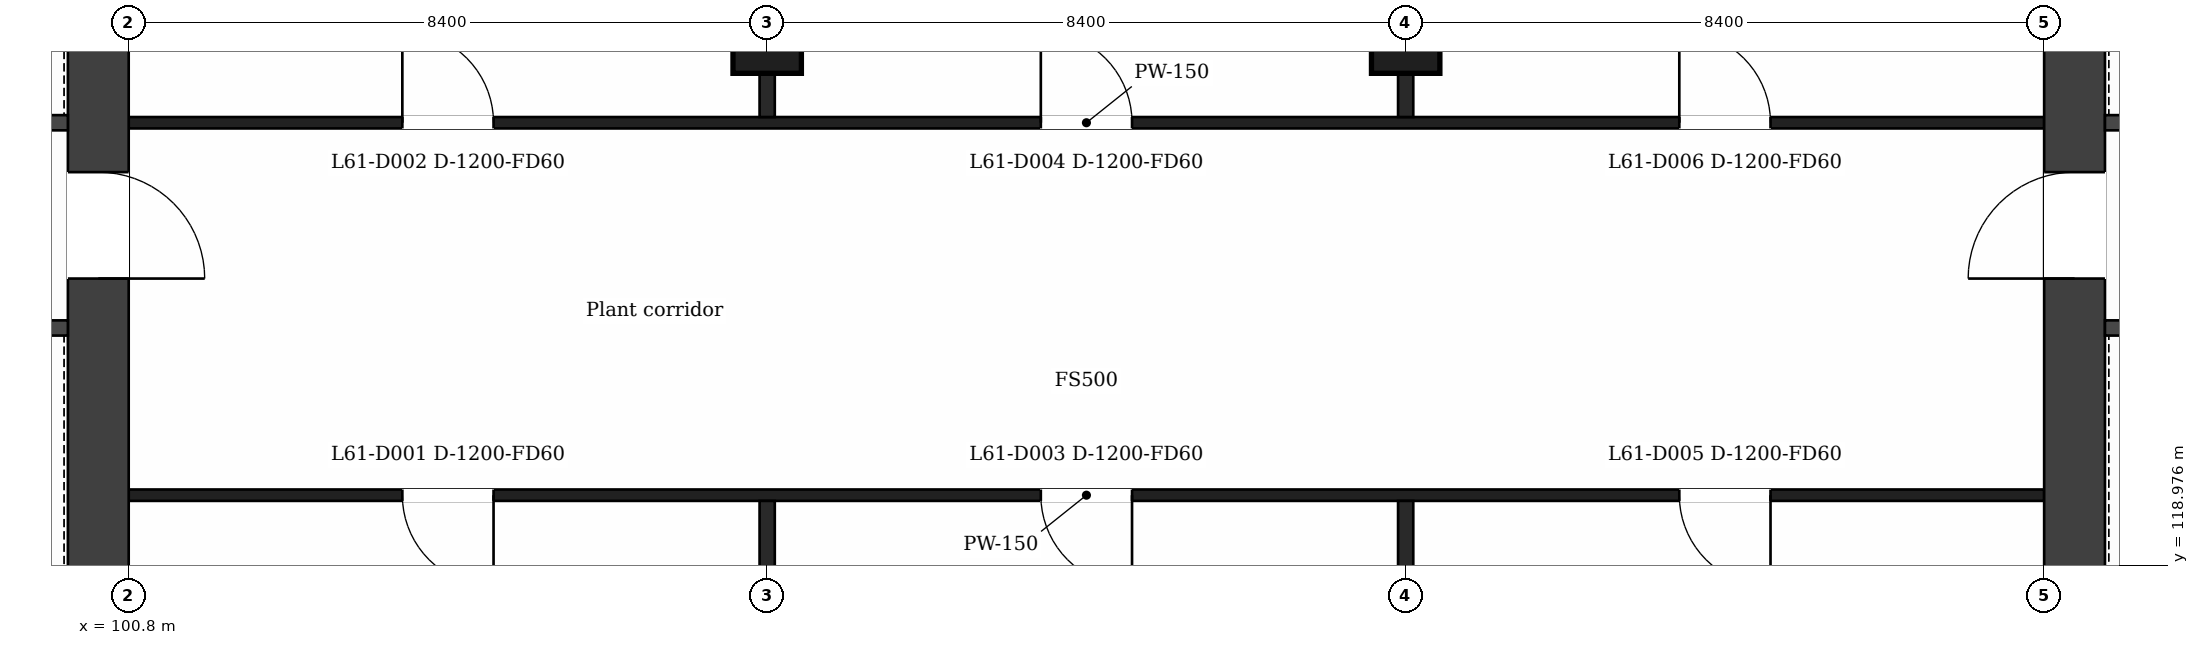
"""IFC4 building model, lengths in metres.
Left out: names, types, materials, properties, quantities, classifications, styles, units other than length and angle.
Written with IfcOpenShell. Run it as: python <this file> out.ifc"""

import sys

from ifc_helpers import new_model, si_unit, direction, frame, frame_2d, origin, origin_2d, place, context, subcontext, project, spatial, rectangle, extrude, element, fill, save


model = new_model("IFC4")
c1 = context("Model", 3, precision=1e-05, world=origin(), true_north=direction((0.0, 1.0)))
c2 = subcontext(c1, "Body", "Model", "MODEL_VIEW")
j1 = project(units=[si_unit("LENGTHUNIT", "METRE"), si_unit("PLANEANGLEUNIT", "RADIAN")], contexts=[c1])
p1 = place(None, origin())
s1 = spatial("IfcSite", under=j1, at=p1, CompositionType="ELEMENT")
p2 = place(p1, origin())
s2 = spatial("IfcBuilding", under=s1, at=p2, CompositionType="ELEMENT")
p3 = place(p2, frame((0.0, 0.0, 254.0)))
s3 = spatial("IfcBuildingStorey", under=s2, at=p3, CompositionType="ELEMENT", Elevation=254.0)
p4 = place(p3, frame((100.4, 132.0, 0.0), z_axis=(0.0, 0.0, 1.0), x_axis=(0.0, -1.0, 0.0)))
e1 = element("IfcWall", 1, at=p4, inside=s3, PredefinedType="SHEAR", context=c2, shape_type="SweptSolid", body=[
    extrude(rectangle(XDim=21.2, YDim=0.8, at=frame_2d((10.6, 0.0))), origin(), (0.0, 0.0, 1.0), 5.0),
])
p5 = place(p4, frame((2.4, 0.0, 0.0)))
e2 = element("IfcOpeningElement", 2, at=p5, cuts=e1, PredefinedType="OPENING", context=c2, shape_type="SweptSolid", body=[
    extrude(rectangle(XDim=1.2, YDim=2.1, at=frame_2d((0.6, 1.05))), frame((0.0, 0.41, 0.0), z_axis=(0.0, -1.0, 0.0), x_axis=(1.0, 0.0, 0.0)), (0.0, 0.0, 1.0), 0.82),
])
p6 = place(p4, frame((7.85, 0.0, 0.0)))
e3 = element("IfcOpeningElement", 3, at=p6, cuts=e1, PredefinedType="OPENING", context=c2, shape_type="SweptSolid", body=[
    extrude(rectangle(XDim=1.4, YDim=2.1, at=frame_2d((0.7, 1.05))), frame((0.0, 0.41, 0.0), z_axis=(0.0, -1.0, 0.0), x_axis=(1.0, 0.0, 0.0)), (0.0, 0.0, 1.0), 0.82),
])
p7 = place(p3, frame((126.4, 110.8, 0.0), z_axis=(0.0, 0.0, 1.0), x_axis=(0.0, 1.0, 0.0)))
e4 = element("IfcWall", 4, at=p7, inside=s3, PredefinedType="SHEAR", context=c2, shape_type="SweptSolid", body=[
    extrude(rectangle(XDim=21.2, YDim=0.8, at=frame_2d((10.6, 0.0))), origin(), (0.0, 0.0, 1.0), 5.0),
])
p8 = place(p7, frame((1.0, 0.0, 0.0)))
e5 = element("IfcOpeningElement", 5, at=p8, cuts=e4, PredefinedType="OPENING", context=c2, shape_type="SweptSolid", body=[
    extrude(rectangle(XDim=1.2, YDim=2.1, at=frame_2d((0.6, 1.05))), frame((0.0, 0.41, 0.0), z_axis=(0.0, -1.0, 0.0), x_axis=(1.0, 0.0, 0.0)), (0.0, 0.0, 1.0), 0.82),
])
p9 = place(p7, frame((11.95, 0.0, 0.0)))
e6 = element("IfcOpeningElement", 6, at=p9, cuts=e4, PredefinedType="OPENING", context=c2, shape_type="SweptSolid", body=[
    extrude(rectangle(XDim=1.4, YDim=2.1, at=frame_2d((0.7, 1.05))), frame((0.0, 0.41, 0.0), z_axis=(0.0, -1.0, 0.0), x_axis=(1.0, 0.0, 0.0)), (0.0, 0.0, 1.0), 0.82),
])
for number, where, z_axis, x_axis in (
    (7, (109.2, 125.9, 0.0), (0.0, 0.0, 1.0), (1.0, 0.0, 0.0)),
    (8, (117.6, 125.9, 0.0), (0.0, 0.0, 1.0), (1.0, 0.0, 0.0)),
):
    element("IfcColumn", number, at=place(p3, frame(where, z_axis=z_axis, x_axis=x_axis)), inside=s3, PredefinedType="COLUMN", context=c2, shape_type="SweptSolid", body=[
        extrude(rectangle(XDim=0.9, YDim=0.9, at=origin_2d()), origin(), (0.0, 0.0, 1.0), 5.0),
    ])
p10 = place(p3, frame((100.8, 119.9, 0.0), z_axis=(0.0, 0.0, 1.0), x_axis=(1.0, 0.0, 0.0)))
e9 = element("IfcWall", 9, at=p10, inside=s3, PredefinedType="PARTITIONING", context=c2, shape_type="SweptSolid", body=[
    extrude(rectangle(XDim=25.2, YDim=0.15, at=frame_2d((12.6, 0.0))), origin(), (0.0, 0.0, 1.0), 4.68),
])
p11 = place(p10, frame((3.6, 0.0, 0.0)))
e10 = element("IfcOpeningElement", 10, at=p11, cuts=e9, PredefinedType="OPENING", context=c2, shape_type="SweptSolid", body=[
    extrude(rectangle(XDim=1.2, YDim=2.1, at=frame_2d((0.6, 1.05))), frame((0.0, 0.085, 0.0), z_axis=(0.0, -1.0, 0.0), x_axis=(1.0, 0.0, 0.0)), (0.0, 0.0, 1.0), 0.17),
])
p12 = place(p10, frame((12.0, 0.0, 0.0)))
e11 = element("IfcOpeningElement", 11, at=p12, cuts=e9, PredefinedType="OPENING", context=c2, shape_type="SweptSolid", body=[
    extrude(rectangle(XDim=1.2, YDim=2.1, at=frame_2d((0.6, 1.05))), frame((0.0, 0.085, 0.0), z_axis=(0.0, -1.0, 0.0), x_axis=(1.0, 0.0, 0.0)), (0.0, 0.0, 1.0), 0.17),
])
p13 = place(p10, frame((20.4, 0.0, 0.0)))
e12 = element("IfcOpeningElement", 12, at=p13, cuts=e9, PredefinedType="OPENING", context=c2, shape_type="SweptSolid", body=[
    extrude(rectangle(XDim=1.2, YDim=2.1, at=frame_2d((0.6, 1.05))), frame((0.0, 0.085, 0.0), z_axis=(0.0, -1.0, 0.0), x_axis=(1.0, 0.0, 0.0)), (0.0, 0.0, 1.0), 0.17),
])
p14 = place(p3, frame((95.227, 122.1, 0.0), z_axis=(0.0, 0.0, 1.0), x_axis=(1.0, 0.0, 0.0)))
e13 = element("IfcWall", 13, at=p14, inside=s3, PredefinedType="PARTITIONING", context=c2, shape_type="SweptSolid", body=[
    extrude(rectangle(XDim=4.773, YDim=0.2, at=frame_2d((2.386, 0.0))), origin(), (0.0, 0.0, 1.0), 4.68),
])
p15 = place(p14, frame((0.585, 0.0, 0.0)))
e14 = element("IfcOpeningElement", 14, at=p15, cuts=e13, PredefinedType="OPENING", context=c2, shape_type="SweptSolid", body=[
    extrude(rectangle(XDim=1.1, YDim=2.1, at=frame_2d((0.55, 1.05))), frame((0.0, 0.11, 0.0), z_axis=(0.0, -1.0, 0.0), x_axis=(1.0, 0.0, 0.0)), (0.0, 0.0, 1.0), 0.22),
])
p16 = place(p14, frame((3.176, 0.0, 0.0)))
e15 = element("IfcOpeningElement", 15, at=p16, cuts=e13, PredefinedType="OPENING", context=c2, shape_type="SweptSolid", body=[
    extrude(rectangle(XDim=1.1, YDim=2.1, at=frame_2d((0.55, 1.05))), frame((0.0, 0.11, 0.0), z_axis=(0.0, -1.0, 0.0), x_axis=(1.0, 0.0, 0.0)), (0.0, 0.0, 1.0), 0.22),
])
p17 = place(p3, frame((126.8, 122.1, 0.0), z_axis=(0.0, 0.0, 1.0), x_axis=(1.0, 0.0, 0.0)))
e16 = element("IfcWall", 16, at=p17, inside=s3, PredefinedType="PARTITIONING", context=c2, shape_type="SweptSolid", body=[
    extrude(rectangle(XDim=4.773, YDim=0.2, at=frame_2d((2.386, 0.0))), origin(), (0.0, 0.0, 1.0), 4.68),
])
p18 = place(p17, frame((3.176, 0.0, 0.0)))
e17 = element("IfcOpeningElement", 17, at=p18, cuts=e16, PredefinedType="OPENING", context=c2, shape_type="SweptSolid", body=[
    extrude(rectangle(XDim=1.1, YDim=2.1, at=frame_2d((0.55, 1.05))), frame((0.0, 0.11, 0.0), z_axis=(0.0, -1.0, 0.0), x_axis=(1.0, 0.0, 0.0)), (0.0, 0.0, 1.0), 0.22),
])
p19 = place(p17, frame((0.497, 0.0, 0.0)))
e18 = element("IfcOpeningElement", 18, at=p19, cuts=e16, PredefinedType="OPENING", context=c2, shape_type="SweptSolid", body=[
    extrude(rectangle(XDim=1.1, YDim=2.1, at=frame_2d((0.55, 1.05))), frame((0.0, 0.11, 0.0), z_axis=(0.0, -1.0, 0.0), x_axis=(1.0, 0.0, 0.0)), (0.0, 0.0, 1.0), 0.22),
])
p20 = place(p3, frame((92.702, 124.8, 0.0), z_axis=(0.0, 0.0, 1.0), x_axis=(1.0, 0.0, 0.0)))
e19 = element("IfcWall", 19, at=p20, inside=s3, PredefinedType="PARTITIONING", context=c2, shape_type="SweptSolid", body=[
    extrude(rectangle(XDim=7.298, YDim=0.2, at=frame_2d((3.649, 0.0))), origin(), (0.0, 0.0, 1.0), 4.68),
])
p21 = place(p20, frame((5.405, 0.0, 0.0)))
e20 = element("IfcOpeningElement", 20, at=p21, cuts=e19, PredefinedType="OPENING", context=c2, shape_type="SweptSolid", body=[
    extrude(rectangle(XDim=1.1, YDim=2.1, at=frame_2d((0.55, 1.05))), frame((0.0, 0.11, 0.0), z_axis=(0.0, -1.0, 0.0), x_axis=(1.0, 0.0, 0.0)), (0.0, 0.0, 1.0), 0.22),
])
p22 = place(p3, frame((126.8, 124.8, 0.0), z_axis=(0.0, 0.0, 1.0), x_axis=(1.0, 0.0, 0.0)))
e21 = element("IfcWall", 21, at=p22, inside=s3, PredefinedType="PARTITIONING", context=c2, shape_type="SweptSolid", body=[
    extrude(rectangle(XDim=4.782, YDim=0.2, at=frame_2d((2.391, 0.0))), origin(), (0.0, 0.0, 1.0), 4.68),
])
p23 = place(p22, frame((0.793, 0.0, 0.0)))
e22 = element("IfcOpeningElement", 22, at=p23, cuts=e21, PredefinedType="OPENING", context=c2, shape_type="SweptSolid", body=[
    extrude(rectangle(XDim=1.1, YDim=2.1, at=frame_2d((0.55, 1.05))), frame((0.0, 0.11, 0.0), z_axis=(0.0, -1.0, 0.0), x_axis=(1.0, 0.0, 0.0)), (0.0, 0.0, 1.0), 0.22),
])
p24 = place(p3, frame((100.8, 124.8, 0.0), z_axis=(0.0, 0.0, 1.0), x_axis=(1.0, 0.0, 0.0)))
e23 = element("IfcWall", 23, at=p24, inside=s3, PredefinedType="PARTITIONING", context=c2, shape_type="SweptSolid", body=[
    extrude(rectangle(XDim=25.2, YDim=0.15, at=frame_2d((12.6, 0.0))), origin(), (0.0, 0.0, 1.0), 4.68),
])
p25 = place(p24, frame((3.6, 0.0, 0.0)))
e24 = element("IfcOpeningElement", 24, at=p25, cuts=e23, PredefinedType="OPENING", context=c2, shape_type="SweptSolid", body=[
    extrude(rectangle(XDim=1.2, YDim=2.1, at=frame_2d((0.6, 1.05))), frame((0.0, 0.085, 0.0), z_axis=(0.0, -1.0, 0.0), x_axis=(1.0, 0.0, 0.0)), (0.0, 0.0, 1.0), 0.17),
])
p26 = place(p24, frame((12.0, 0.0, 0.0)))
e25 = element("IfcOpeningElement", 25, at=p26, cuts=e23, PredefinedType="OPENING", context=c2, shape_type="SweptSolid", body=[
    extrude(rectangle(XDim=1.2, YDim=2.1, at=frame_2d((0.6, 1.05))), frame((0.0, 0.085, 0.0), z_axis=(0.0, -1.0, 0.0), x_axis=(1.0, 0.0, 0.0)), (0.0, 0.0, 1.0), 0.17),
])
p27 = place(p24, frame((20.4, 0.0, 0.0)))
e26 = element("IfcOpeningElement", 26, at=p27, cuts=e23, PredefinedType="OPENING", context=c2, shape_type="SweptSolid", body=[
    extrude(rectangle(XDim=1.2, YDim=2.1, at=frame_2d((0.6, 1.05))), frame((0.0, 0.085, 0.0), z_axis=(0.0, -1.0, 0.0), x_axis=(1.0, 0.0, 0.0)), (0.0, 0.0, 1.0), 0.17),
])
p28 = place(p3, frame((109.2, 110.5, 0.0), z_axis=(0.0, 0.0, 1.0), x_axis=(0.0, 1.0, 0.0)))
e27 = element("IfcWall", 27, at=p28, inside=s3, PredefinedType="PARTITIONING", context=c2, shape_type="SweptSolid", body=[
    extrude(rectangle(XDim=9.325, YDim=0.2, at=frame_2d((4.663, 0.0))), origin(), (0.0, 0.0, 1.0), 4.68),
])
p29 = place(p3, frame((109.2, 124.875, 0.0), z_axis=(0.0, 0.0, 1.0), x_axis=(0.0, 1.0, 0.0)))
e28 = element("IfcWall", 28, at=p29, inside=s3, PredefinedType="PARTITIONING", context=c2, shape_type="SweptSolid", body=[
    extrude(rectangle(XDim=7.425, YDim=0.2, at=frame_2d((3.712, 0.0))), origin(), (0.0, 0.0, 1.0), 4.68),
])
p30 = place(p3, frame((117.6, 110.5, 0.0), z_axis=(0.0, 0.0, 1.0), x_axis=(0.0, 1.0, 0.0)))
e29 = element("IfcWall", 29, at=p30, inside=s3, PredefinedType="PARTITIONING", context=c2, shape_type="SweptSolid", body=[
    extrude(rectangle(XDim=9.325, YDim=0.2, at=frame_2d((4.663, 0.0))), origin(), (0.0, 0.0, 1.0), 4.68),
])
p31 = place(p3, frame((117.6, 124.875, 0.0), z_axis=(0.0, 0.0, 1.0), x_axis=(0.0, 1.0, 0.0)))
e30 = element("IfcWall", 30, at=p31, inside=s3, PredefinedType="PARTITIONING", context=c2, shape_type="SweptSolid", body=[
    extrude(rectangle(XDim=7.425, YDim=0.2, at=frame_2d((3.712, 0.0))), origin(), (0.0, 0.0, 1.0), 4.68),
])
p32 = place(p11, origin())
e31 = element("IfcDoor", 31, at=p32, inside=s3, OperationType="SINGLE_SWING_RIGHT", PredefinedType="DOOR", context=c2, shape_type="SweptSolid", body=[
    extrude(rectangle(XDim=1.2, YDim=2.1, at=frame_2d((0.6, 1.05))), frame((0.0, 0.025, 0.0), z_axis=(0.0, -1.0, 0.0), x_axis=(1.0, 0.0, 0.0)), (0.0, 0.0, 1.0), 0.05),
])
fill(e10, e31)
p33 = place(p25, origin())
e32 = element("IfcDoor", 32, at=p33, inside=s3, OperationType="SINGLE_SWING_LEFT", PredefinedType="DOOR", context=c2, shape_type="SweptSolid", body=[
    extrude(rectangle(XDim=1.2, YDim=2.1, at=frame_2d((0.6, 1.05))), frame((0.0, 0.025, 0.0), z_axis=(0.0, -1.0, 0.0), x_axis=(1.0, 0.0, 0.0)), (0.0, 0.0, 1.0), 0.05),
])
fill(e24, e32)
p34 = place(p12, origin())
e33 = element("IfcDoor", 33, at=p34, inside=s3, OperationType="SINGLE_SWING_RIGHT", PredefinedType="DOOR", context=c2, shape_type="SweptSolid", body=[
    extrude(rectangle(XDim=1.2, YDim=2.1, at=frame_2d((0.6, 1.05))), frame((0.0, 0.025, 0.0), z_axis=(0.0, -1.0, 0.0), x_axis=(1.0, 0.0, 0.0)), (0.0, 0.0, 1.0), 0.05),
])
fill(e11, e33)
p35 = place(p26, origin())
e34 = element("IfcDoor", 34, at=p35, inside=s3, OperationType="SINGLE_SWING_LEFT", PredefinedType="DOOR", context=c2, shape_type="SweptSolid", body=[
    extrude(rectangle(XDim=1.2, YDim=2.1, at=frame_2d((0.6, 1.05))), frame((0.0, 0.025, 0.0), z_axis=(0.0, -1.0, 0.0), x_axis=(1.0, 0.0, 0.0)), (0.0, 0.0, 1.0), 0.05),
])
fill(e25, e34)
p36 = place(p13, origin())
e35 = element("IfcDoor", 35, at=p36, inside=s3, OperationType="SINGLE_SWING_RIGHT", PredefinedType="DOOR", context=c2, shape_type="SweptSolid", body=[
    extrude(rectangle(XDim=1.2, YDim=2.1, at=frame_2d((0.6, 1.05))), frame((0.0, 0.025, 0.0), z_axis=(0.0, -1.0, 0.0), x_axis=(1.0, 0.0, 0.0)), (0.0, 0.0, 1.0), 0.05),
])
fill(e12, e35)
p37 = place(p27, origin())
e36 = element("IfcDoor", 36, at=p37, inside=s3, OperationType="SINGLE_SWING_LEFT", PredefinedType="DOOR", context=c2, shape_type="SweptSolid", body=[
    extrude(rectangle(XDim=1.2, YDim=2.1, at=frame_2d((0.6, 1.05))), frame((0.0, 0.025, 0.0), z_axis=(0.0, -1.0, 0.0), x_axis=(1.0, 0.0, 0.0)), (0.0, 0.0, 1.0), 0.05),
])
fill(e26, e36)
p38 = place(p6, origin())
e37 = element("IfcDoor", 37, at=p38, inside=s3, OperationType="SINGLE_SWING_RIGHT", PredefinedType="DOOR", context=c2, shape_type="SweptSolid", body=[
    extrude(rectangle(XDim=1.4, YDim=2.1, at=frame_2d((0.7, 1.05))), frame((0.0, 0.025, 0.0), z_axis=(0.0, -1.0, 0.0), x_axis=(1.0, 0.0, 0.0)), (0.0, 0.0, 1.0), 0.05),
])
fill(e3, e37)
p39 = place(p9, origin())
e38 = element("IfcDoor", 38, at=p39, inside=s3, OperationType="SINGLE_SWING_LEFT", PredefinedType="DOOR", context=c2, shape_type="SweptSolid", body=[
    extrude(rectangle(XDim=1.4, YDim=2.1, at=frame_2d((0.7, 1.05))), frame((0.0, 0.025, 0.0), z_axis=(0.0, -1.0, 0.0), x_axis=(1.0, 0.0, 0.0)), (0.0, 0.0, 1.0), 0.05),
])
fill(e6, e38)
save(model, sys.argv[1])
